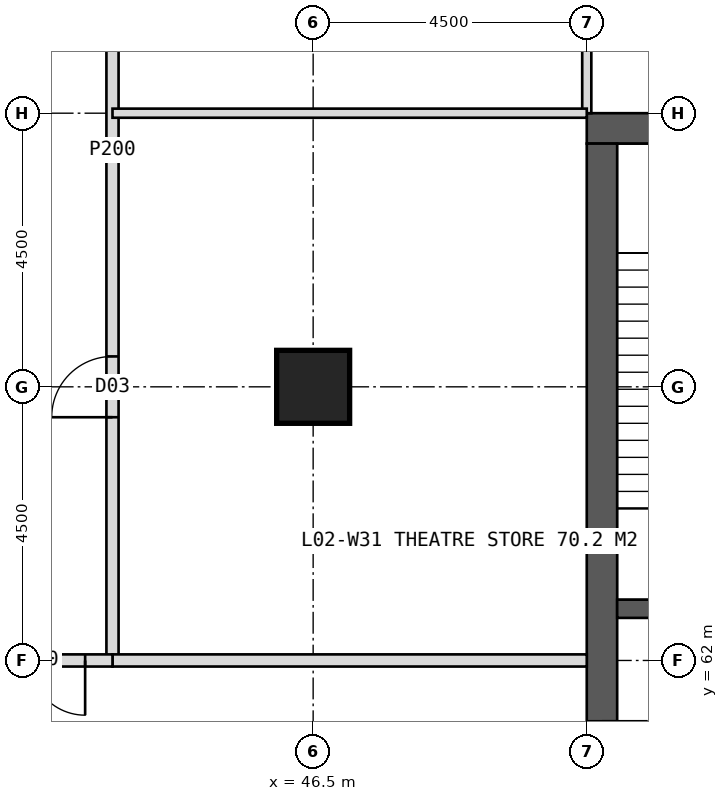
"""IFC4 building model, lengths in metres.
Left out: names, types, materials, properties, quantities, classifications, styles, units other than length and angle.
Written with IfcOpenShell. Run it as: python <this file> out.ifc"""

import sys

from ifc_helpers import new_model, si_unit, direction, frame, frame_2d, origin, origin_2d, place, context, subcontext, project, spatial, rectangle, hollow_rectangle, extrude, element, fill, save


model = new_model("IFC4")
c1 = context("Model", 3, precision=1e-05, world=origin(), true_north=direction((0.0, 1.0)))
c2 = subcontext(c1, "Body", "Model", "MODEL_VIEW")
j1 = project(units=[si_unit("LENGTHUNIT", "METRE"), si_unit("PLANEANGLEUNIT", "RADIAN")], contexts=[c1])
p1 = place(None, origin())
s1 = spatial("IfcSite", under=j1, at=p1, CompositionType="ELEMENT")
p2 = place(p1, origin())
s2 = spatial("IfcBuilding", under=s1, at=p2, CompositionType="ELEMENT")
p3 = place(p2, frame((0.0, 0.0, 11.0)))
s3 = spatial("IfcBuildingStorey", under=s2, at=p3, CompositionType="ELEMENT", Elevation=11.0)
p4 = place(p3, frame((51.0, 70.75, 0.0), z_axis=(0.0, 0.0, 1.0), x_axis=(1.0, 0.0, 0.0)))
e1 = element("IfcWall", 1, at=p4, inside=s3, PredefinedType="SHEAR", context=c2, shape_type="SweptSolid", body=[
    extrude(rectangle(XDim=18.0, YDim=0.5, at=frame_2d((9.0, 0.0))), origin(), (0.0, 0.0, 1.0), 5.5),
])
p5 = place(p4, frame((8.1, 0.0, 0.0)))
e2 = element("IfcOpeningElement", 2, at=p5, cuts=e1, PredefinedType="OPENING", context=c2, shape_type="SweptSolid", body=[
    extrude(rectangle(XDim=1.8, YDim=2.2, at=frame_2d((0.9, 1.1))), frame((0.0, 0.26, 0.0), z_axis=(0.0, -1.0, 0.0), x_axis=(1.0, 0.0, 0.0)), (0.0, 0.0, 1.0), 0.52),
])
p6 = place(p3, frame((51.25, 53.5, 0.0), z_axis=(0.0, 0.0, 1.0), x_axis=(0.0, 1.0, 0.0)))
e3 = element("IfcWall", 3, at=p6, inside=s3, PredefinedType="SHEAR", context=c2, shape_type="SweptSolid", body=[
    extrude(rectangle(XDim=17.0, YDim=0.5, at=frame_2d((8.5, 0.0))), origin(), (0.0, 0.0, 1.0), 5.5),
])
p7 = place(p6, frame((6.0, 0.0, 0.0)))
e4 = element("IfcOpeningElement", 4, at=p7, cuts=e3, PredefinedType="OPENING", context=c2, shape_type="SweptSolid", body=[
    extrude(rectangle(XDim=1.5, YDim=2.2, at=frame_2d((0.75, 1.1))), frame((0.0, 0.26, 0.0), z_axis=(0.0, -1.0, 0.0), x_axis=(1.0, 0.0, 0.0)), (0.0, 0.0, 1.0), 0.52),
])
p8 = place(p3, frame((51.5, 62.85, 0.0), z_axis=(0.0, 0.0, 1.0), x_axis=(1.0, 0.0, 0.0)))
e5 = element("IfcWall", 5, at=p8, inside=s3, PredefinedType="SHEAR", context=c2, shape_type="SweptSolid", body=[
    extrude(rectangle(XDim=3.3, YDim=0.3, at=frame_2d((1.65, 0.0))), origin(), (0.0, 0.0, 1.0), 5.5),
])
p9 = place(p8, frame((1.05, 0.0, 0.0)))
e6 = element("IfcOpeningElement", 6, at=p9, cuts=e5, PredefinedType="OPENING", context=c2, shape_type="SweptSolid", body=[
    extrude(rectangle(XDim=1.2, YDim=2.1, at=frame_2d((0.6, 1.05))), frame((0.0, 0.16, 0.0), z_axis=(0.0, -1.0, 0.0), x_axis=(1.0, 0.0, 0.0)), (0.0, 0.0, 1.0), 0.32),
])
p10 = place(p3, frame((46.5, 66.5, 0.0), z_axis=(0.0, 0.0, 1.0), x_axis=(1.0, 0.0, 0.0)))
e7 = element("IfcColumn", 7, at=p10, inside=s3, PredefinedType="COLUMN", context=c2, shape_type="SweptSolid", body=[
    extrude(hollow_rectangle(XDim=1.2, YDim=1.2, WallThickness=0.1, at=origin_2d()), origin(), (0.0, 0.0, 1.0), 5.5),
])
p11 = place(p3, frame((51.0, 71.0, 0.0), z_axis=(0.0, 0.0, 1.0), x_axis=(0.0, 1.0, 0.0)))
e8 = element("IfcWall", 8, at=p11, inside=s3, PredefinedType="PARTITIONING", context=c2, shape_type="SweptSolid", body=[
    extrude(rectangle(XDim=7.8, YDim=0.15, at=frame_2d((3.9, 0.0))), origin(), (0.0, 0.0, 1.0), 5.2),
])
p12 = place(p3, frame((43.2, 62.0, 0.0), z_axis=(0.0, 0.0, 1.0), x_axis=(0.0, 1.0, 0.0)))
e9 = element("IfcWall", 9, at=p12, inside=s3, PredefinedType="PARTITIONING", context=c2, shape_type="SweptSolid", body=[
    extrude(rectangle(XDim=16.8, YDim=0.2, at=frame_2d((8.4, 0.0))), origin(), (0.0, 0.0, 1.0), 5.2),
])
p13 = place(p12, frame((4.0, 0.0, 0.0)))
e10 = element("IfcOpeningElement", 10, at=p13, cuts=e9, PredefinedType="OPENING", context=c2, shape_type="SweptSolid", body=[
    extrude(rectangle(XDim=1.0, YDim=2.1, at=frame_2d((0.5, 1.05))), frame((0.0, 0.11, 0.0), z_axis=(0.0, -1.0, 0.0), x_axis=(1.0, 0.0, 0.0)), (0.0, 0.0, 1.0), 0.22),
])
p14 = place(p12, frame((12.4, 0.0, 0.0)))
e11 = element("IfcOpeningElement", 11, at=p14, cuts=e9, PredefinedType="OPENING", context=c2, shape_type="SweptSolid", body=[
    extrude(rectangle(XDim=1.0, YDim=2.1, at=frame_2d((0.5, 1.05))), frame((0.0, 0.11, 0.0), z_axis=(0.0, -1.0, 0.0), x_axis=(1.0, 0.0, 0.0)), (0.0, 0.0, 1.0), 0.22),
])
p15 = place(p3, frame((51.0, 62.0, 0.0), z_axis=(0.0, 0.0, 1.0), x_axis=(-1.0, 0.0, 0.0)))
e12 = element("IfcWall", 12, at=p15, inside=s3, PredefinedType="SOLIDWALL", context=c2, shape_type="SweptSolid", body=[
    extrude(rectangle(XDim=7.8, YDim=0.2, at=frame_2d((3.9, 0.0))), origin(), (0.0, 0.0, 1.0), 4.4),
])
p16 = place(p3, frame((51.0, 71.0, 0.0), z_axis=(0.0, 0.0, 1.0), x_axis=(-1.0, 0.0, 0.0)))
e13 = element("IfcWall", 13, at=p16, inside=s3, PredefinedType="PARTITIONING", context=c2, shape_type="SweptSolid", body=[
    extrude(rectangle(XDim=7.8, YDim=0.15, at=frame_2d((3.9, 0.0))), origin(), (0.0, 0.0, 1.0), 5.2),
])
p17 = place(p3, frame((43.2, 62.0, 0.0), z_axis=(0.0, 0.0, 1.0), x_axis=(-1.0, 0.0, 0.0)))
e14 = element("IfcWall", 14, at=p17, inside=s3, PredefinedType="SOLIDWALL", context=c2, shape_type="SweptSolid", body=[
    extrude(rectangle(XDim=2.7, YDim=0.2, at=frame_2d((1.35, 0.0))), origin(), (0.0, 0.0, 1.0), 4.4),
])
p18 = place(p17, frame((0.45, 0.0, 0.0)))
e15 = element("IfcOpeningElement", 15, at=p18, cuts=e14, PredefinedType="OPENING", context=c2, shape_type="SweptSolid", body=[
    extrude(rectangle(XDim=1.8, YDim=2.2, at=frame_2d((0.9, 1.1))), frame((0.0, 0.11, 0.0), z_axis=(0.0, -1.0, 0.0), x_axis=(1.0, 0.0, 0.0)), (0.0, 0.0, 1.0), 0.22),
])
p19 = place(p13, origin())
e16 = element("IfcDoor", 16, at=p19, inside=s3, OperationType="SINGLE_SWING_LEFT", PredefinedType="DOOR", context=c2, shape_type="SweptSolid", body=[
    extrude(rectangle(XDim=1.0, YDim=2.1, at=frame_2d((0.5, 1.05))), frame((0.0, 0.025, 0.0), z_axis=(0.0, -1.0, 0.0), x_axis=(1.0, 0.0, 0.0)), (0.0, 0.0, 1.0), 0.05),
])
fill(e10, e16)
p20 = place(p18, origin())
e17 = element("IfcDoor", 17, at=p20, inside=s3, OperationType="DOUBLE_DOOR_DOUBLE_SWING", PredefinedType="DOOR", context=c2, shape_type="SweptSolid", body=[
    extrude(rectangle(XDim=1.8, YDim=2.2, at=frame_2d((0.9, 1.1))), frame((0.0, 0.025, 0.0), z_axis=(0.0, -1.0, 0.0), x_axis=(1.0, 0.0, 0.0)), (0.0, 0.0, 1.0), 0.05),
])
fill(e15, e17)
save(model, sys.argv[1])
